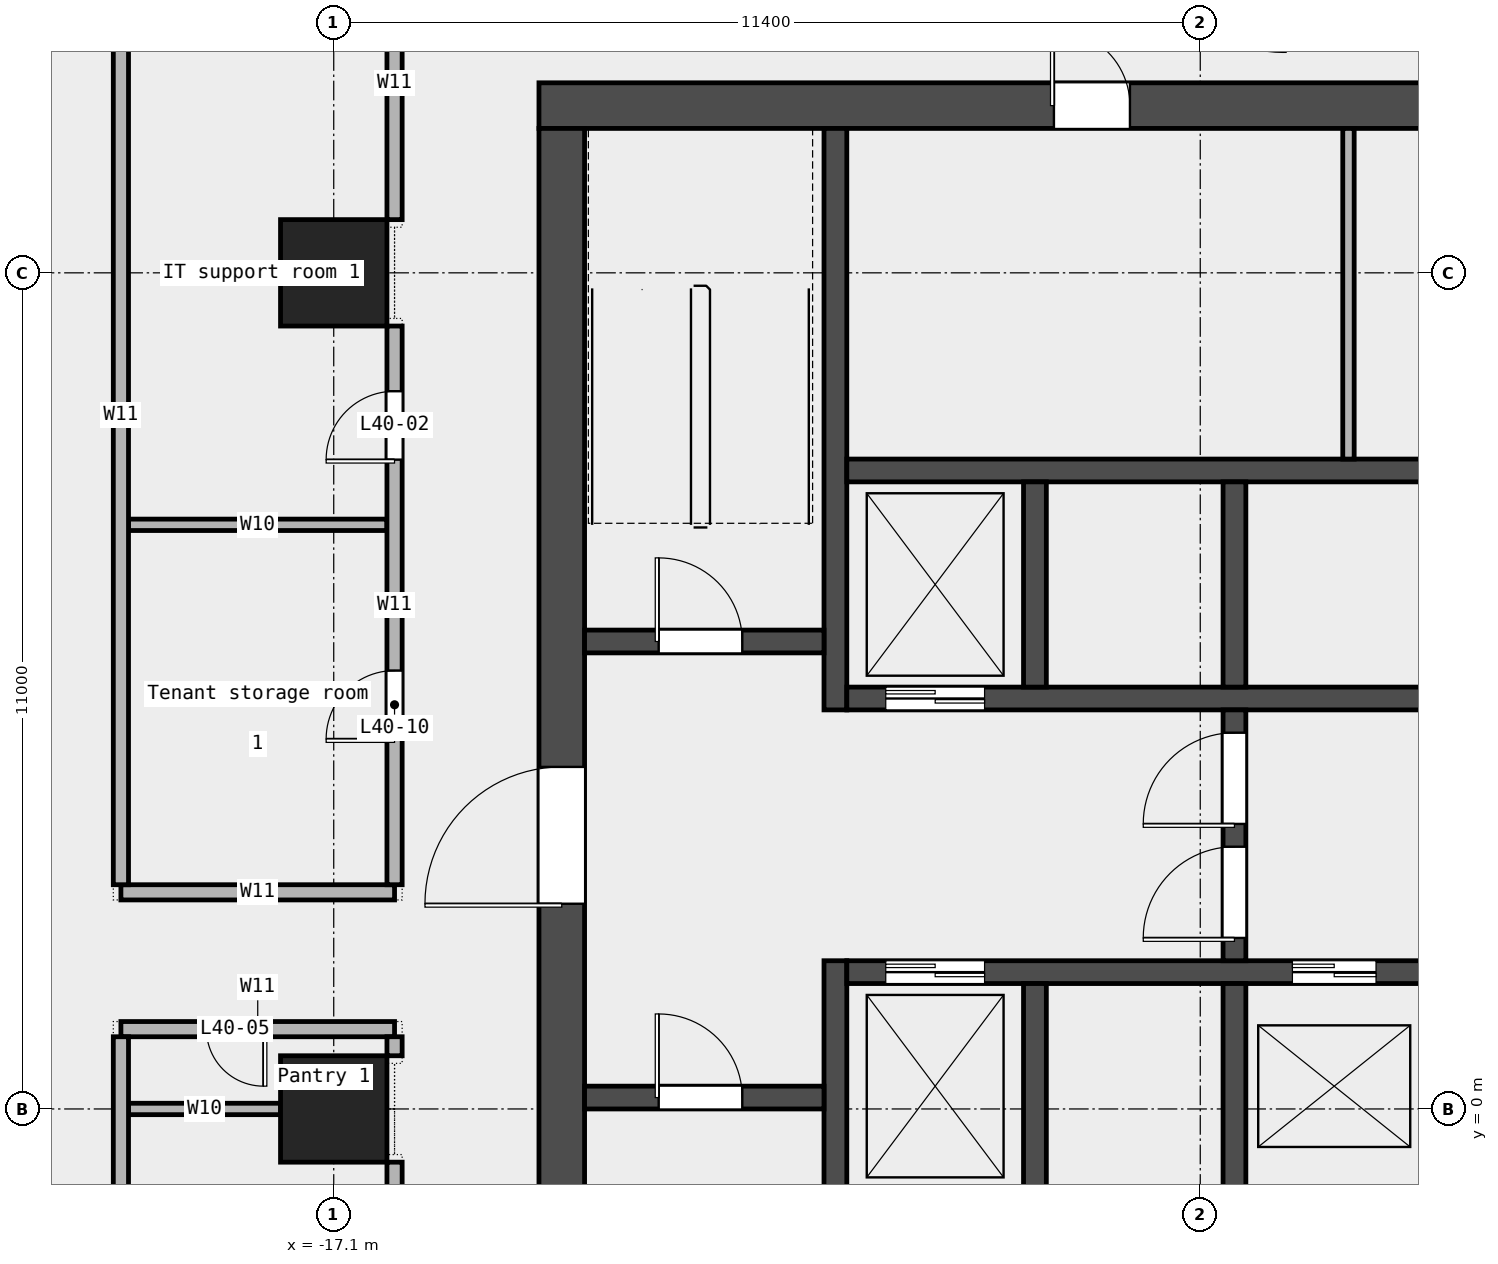
"""IFC4 building model, lengths in metres.
Left out: names, types, materials, properties, quantities, classifications, styles, units other than length and angle.
Written with IfcOpenShell. Run it as: python <this file> out.ifc"""

import sys

from ifc_helpers import new_model, si_unit, direction, frame, frame_2d, origin, origin_2d, place, context, subcontext, project, spatial, rectangle, extrude, element, fill, save


model = new_model("IFC4")
c1 = context("Model", 3, precision=1e-05, world=origin(), true_north=direction((0.0, 1.0)))
c2 = subcontext(c1, "Body", "Model", "MODEL_VIEW")
j1 = project(units=[si_unit("LENGTHUNIT", "METRE"), si_unit("PLANEANGLEUNIT", "RADIAN")], contexts=[c1])
p1 = place(None, origin())
s1 = spatial("IfcSite", under=j1, at=p1, CompositionType="ELEMENT")
p2 = place(p1, origin())
s2 = spatial("IfcBuilding", under=s1, at=p2, CompositionType="ELEMENT")
p3 = place(p2, frame((0.0, 0.0, 193.0)))
s3 = spatial("IfcBuildingStorey", under=s2, at=p3, CompositionType="ELEMENT", Elevation=193.0)
for number, where, z_axis, x_axis in (
    (1, (-17.1, 0.0, 0.0), (0.0, 0.0, 1.0), (1.0, 0.0, 0.0)),
    (2, (-17.1, 11.0, 0.0), (0.0, 0.0, 1.0), (1.0, 0.0, 0.0)),
):
    element("IfcColumn", number, at=place(p3, frame(where, z_axis=z_axis, x_axis=x_axis)), inside=s3, PredefinedType="COLUMN", context=c2, shape_type="SweptSolid", body=[
        extrude(rectangle(XDim=1.4, YDim=1.4, at=origin_2d()), origin(), (0.0, 0.0, 1.0), 3.6),
    ])
p4 = place(p3, frame((-19.8, 0.0, 0.0), z_axis=(0.0, 0.0, 1.0), x_axis=(1.0, 0.0, 0.0)))
e3 = element("IfcWall", 3, at=p4, inside=s3, PredefinedType="PARTITIONING", context=c2, shape_type="SweptSolid", body=[
    extrude(rectangle(XDim=2.0, YDim=0.15, at=frame_2d((1.0, 0.0))), origin(), (0.0, 0.0, 1.0), 3.6),
])
p5 = place(p3, frame((-19.9, 1.05, 0.0), z_axis=(0.0, 0.0, 1.0), x_axis=(1.0, 0.0, 0.0)))
e4 = element("IfcWall", 4, at=p5, inside=s3, PredefinedType="PARTITIONING", context=c2, shape_type="SweptSolid", body=[
    extrude(rectangle(XDim=3.6, YDim=0.2, at=frame_2d((1.8, 0.0))), origin(), (0.0, 0.0, 1.0), 3.6),
])
p6 = place(p5, frame((1.125, 0.0, 0.0)))
e5 = element("IfcOpeningElement", 5, at=p6, cuts=e4, PredefinedType="OPENING", context=c2, shape_type="SweptSolid", body=[
    extrude(rectangle(XDim=0.75, YDim=2.1, at=frame_2d((0.375, 1.05))), frame((0.0, 0.112, 0.0), z_axis=(0.0, -1.0, 0.0), x_axis=(1.0, 0.0, 0.0)), (0.0, 0.0, 1.0), 0.224),
])
p7 = place(p3, frame((-19.9, 2.85, 0.0), z_axis=(0.0, 0.0, 1.0), x_axis=(1.0, 0.0, 0.0)))
e6 = element("IfcWall", 6, at=p7, inside=s3, PredefinedType="PARTITIONING", context=c2, shape_type="SweptSolid", body=[
    extrude(rectangle(XDim=3.6, YDim=0.2, at=frame_2d((1.8, 0.0))), origin(), (0.0, 0.0, 1.0), 3.6),
])
p8 = place(p3, frame((-19.8, 7.685, 0.0), z_axis=(0.0, 0.0, 1.0), x_axis=(1.0, 0.0, 0.0)))
e7 = element("IfcWall", 7, at=p8, inside=s3, PredefinedType="PARTITIONING", context=c2, shape_type="SweptSolid", body=[
    extrude(rectangle(XDim=3.4, YDim=0.15, at=frame_2d((1.7, 0.0))), origin(), (0.0, 0.0, 1.0), 3.6),
])
p9 = place(p3, frame((-19.9, -9.0, 0.0), z_axis=(0.0, 0.0, 1.0), x_axis=(0.0, 1.0, 0.0)))
e8 = element("IfcWall", 8, at=p9, inside=s3, PredefinedType="PARTITIONING", context=c2, shape_type="SweptSolid", body=[
    extrude(rectangle(XDim=9.95, YDim=0.2, at=frame_2d((4.975, 0.0))), origin(), (0.0, 0.0, 1.0), 3.6),
])
p10 = place(p3, frame((-19.9, 2.95, 0.0), z_axis=(0.0, 0.0, 1.0), x_axis=(0.0, 1.0, 0.0)))
e9 = element("IfcWall", 9, at=p10, inside=s3, PredefinedType="PARTITIONING", context=c2, shape_type="SweptSolid", body=[
    extrude(rectangle(XDim=12.35, YDim=0.2, at=frame_2d((6.175, 0.0))), origin(), (0.0, 0.0, 1.0), 3.6),
])
p11 = place(p3, frame((-16.3, -9.0, 0.0), z_axis=(0.0, 0.0, 1.0), x_axis=(0.0, 1.0, 0.0)))
e10 = element("IfcWall", 10, at=p11, inside=s3, PredefinedType="PARTITIONING", context=c2, shape_type="SweptSolid", body=[
    extrude(rectangle(XDim=8.3, YDim=0.2, at=frame_2d((4.15, 0.0))), origin(), (0.0, 0.0, 1.0), 3.6),
])
p12 = place(p3, frame((-16.3, 0.7, 0.0), z_axis=(0.0, 0.0, 1.0), x_axis=(0.0, 1.0, 0.0)))
e11 = element("IfcWall", 11, at=p12, inside=s3, PredefinedType="PARTITIONING", context=c2, shape_type="SweptSolid", body=[
    extrude(rectangle(XDim=0.25, YDim=0.2, at=frame_2d((0.125, 0.0))), origin(), (0.0, 0.0, 1.0), 3.6),
])
p13 = place(p3, frame((-16.3, 2.95, 0.0), z_axis=(0.0, 0.0, 1.0), x_axis=(0.0, 1.0, 0.0)))
e12 = element("IfcWall", 12, at=p13, inside=s3, PredefinedType="PARTITIONING", context=c2, shape_type="SweptSolid", body=[
    extrude(rectangle(XDim=7.35, YDim=0.2, at=frame_2d((3.675, 0.0))), origin(), (0.0, 0.0, 1.0), 3.6),
])
p14 = place(p13, frame((5.593, 0.0, 0.0)))
e13 = element("IfcOpeningElement", 13, at=p14, cuts=e12, PredefinedType="OPENING", context=c2, shape_type="SweptSolid", body=[
    extrude(rectangle(XDim=0.9, YDim=2.1, at=frame_2d((0.45, 1.05))), frame((0.0, 0.112, 0.0), z_axis=(0.0, -1.0, 0.0), x_axis=(1.0, 0.0, 0.0)), (0.0, 0.0, 1.0), 0.224),
])
p15 = place(p13, frame((1.917, 0.0, 0.0)))
e14 = element("IfcOpeningElement", 14, at=p15, cuts=e12, PredefinedType="OPENING", context=c2, shape_type="SweptSolid", body=[
    extrude(rectangle(XDim=0.9, YDim=2.1, at=frame_2d((0.45, 1.05))), frame((0.0, 0.112, 0.0), z_axis=(0.0, -1.0, 0.0), x_axis=(1.0, 0.0, 0.0)), (0.0, 0.0, 1.0), 0.224),
])
p16 = place(p3, frame((-16.3, 11.7, 0.0), z_axis=(0.0, 0.0, 1.0), x_axis=(0.0, 1.0, 0.0)))
e15 = element("IfcWall", 15, at=p16, inside=s3, PredefinedType="PARTITIONING", context=c2, shape_type="SweptSolid", body=[
    extrude(rectangle(XDim=3.6, YDim=0.2, at=frame_2d((1.8, 0.0))), origin(), (0.0, 0.0, 1.0), 3.6),
])
p17 = place(p3, frame((-14.4, 13.2, 0.0), z_axis=(0.0, 0.0, 1.0), x_axis=(1.0, 0.0, 0.0)))
e16 = element("IfcWall", 16, at=p17, inside=s3, PredefinedType="SHEAR", context=c2, shape_type="SweptSolid", body=[
    extrude(rectangle(XDim=28.8, YDim=0.6, at=frame_2d((14.4, 0.0))), origin(), (0.0, 0.0, 1.0), 3.7),
])
p18 = place(p17, frame((6.775, 0.0, 0.0)))
e17 = element("IfcOpeningElement", 17, at=p18, cuts=e16, PredefinedType="OPENING", context=c2, shape_type="SweptSolid", body=[
    extrude(rectangle(XDim=1.0, YDim=2.1, at=frame_2d((0.5, 1.05))), frame((0.0, 0.312, 0.0), z_axis=(0.0, -1.0, 0.0), x_axis=(1.0, 0.0, 0.0)), (0.0, 0.0, 1.0), 0.624),
])
p19 = place(p17, frame((13.525, 0.0, 0.0)))
e18 = element("IfcOpeningElement", 18, at=p19, cuts=e16, PredefinedType="OPENING", context=c2, shape_type="SweptSolid", body=[
    extrude(rectangle(XDim=1.0, YDim=2.1, at=frame_2d((0.5, 1.05))), frame((0.0, 0.312, 0.0), z_axis=(0.0, -1.0, 0.0), x_axis=(1.0, 0.0, 0.0)), (0.0, 0.0, 1.0), 0.624),
])
p20 = place(p17, frame((20.65, 0.0, 0.0)))
e19 = element("IfcOpeningElement", 19, at=p20, cuts=e16, PredefinedType="OPENING", context=c2, shape_type="SweptSolid", body=[
    extrude(rectangle(XDim=1.0, YDim=2.1, at=frame_2d((0.5, 1.05))), frame((0.0, 0.312, 0.0), z_axis=(0.0, -1.0, 0.0), x_axis=(1.0, 0.0, 0.0)), (0.0, 0.0, 1.0), 0.624),
])
p21 = place(p3, frame((-14.1, -6.6, 0.0), z_axis=(0.0, 0.0, 1.0), x_axis=(0.0, 1.0, 0.0)))
e20 = element("IfcWall", 20, at=p21, inside=s3, PredefinedType="SHEAR", context=c2, shape_type="SweptSolid", body=[
    extrude(rectangle(XDim=19.5, YDim=0.6, at=frame_2d((9.75, 0.0))), origin(), (0.0, 0.0, 1.0), 3.7),
])
p22 = place(p21, frame((9.3, 0.0, 0.0)))
e21 = element("IfcOpeningElement", 21, at=p22, cuts=e20, PredefinedType="OPENING", context=c2, shape_type="SweptSolid", body=[
    extrude(rectangle(XDim=1.8, YDim=2.1, at=frame_2d((0.9, 1.05))), frame((0.0, 0.312, 0.0), z_axis=(0.0, -1.0, 0.0), x_axis=(1.0, 0.0, 0.0)), (0.0, 0.0, 1.0), 0.624),
])
p23 = place(p3, frame((-10.5, -6.6, 0.0), z_axis=(0.0, 0.0, 1.0), x_axis=(0.0, 1.0, 0.0)))
e22 = element("IfcWall", 22, at=p23, inside=s3, PredefinedType="SHEAR", context=c2, shape_type="SweptSolid", body=[
    extrude(rectangle(XDim=8.55, YDim=0.3, at=frame_2d((4.275, 0.0))), origin(), (0.0, 0.0, 1.0), 3.7),
])
p24 = place(p3, frame((-10.5, 5.25, 0.0), z_axis=(0.0, 0.0, 1.0), x_axis=(0.0, 1.0, 0.0)))
e23 = element("IfcWall", 23, at=p24, inside=s3, PredefinedType="SHEAR", context=c2, shape_type="SweptSolid", body=[
    extrude(rectangle(XDim=7.65, YDim=0.3, at=frame_2d((3.825, 0.0))), origin(), (0.0, 0.0, 1.0), 3.7),
])
p25 = place(p3, frame((-13.8, 0.15, 0.0), z_axis=(0.0, 0.0, 1.0), x_axis=(1.0, 0.0, 0.0)))
e24 = element("IfcWall", 24, at=p25, inside=s3, PredefinedType="SOLIDWALL", context=c2, shape_type="SweptSolid", body=[
    extrude(rectangle(XDim=3.15, YDim=0.3, at=frame_2d((1.575, 0.0))), origin(), (0.0, 0.0, 1.0), 3.7),
])
p26 = place(p25, frame((0.975, 0.0, 0.0)))
e25 = element("IfcOpeningElement", 25, at=p26, cuts=e24, PredefinedType="OPENING", context=c2, shape_type="SweptSolid", body=[
    extrude(rectangle(XDim=1.1, YDim=2.1, at=frame_2d((0.55, 1.05))), frame((0.0, 0.162, 0.0), z_axis=(0.0, -1.0, 0.0), x_axis=(1.0, 0.0, 0.0)), (0.0, 0.0, 1.0), 0.324),
])
p27 = place(p3, frame((-13.8, 6.15, 0.0), z_axis=(0.0, 0.0, 1.0), x_axis=(1.0, 0.0, 0.0)))
e26 = element("IfcWall", 26, at=p27, inside=s3, PredefinedType="SOLIDWALL", context=c2, shape_type="SweptSolid", body=[
    extrude(rectangle(XDim=3.15, YDim=0.3, at=frame_2d((1.575, 0.0))), origin(), (0.0, 0.0, 1.0), 3.7),
])
p28 = place(p27, frame((0.975, 0.0, 0.0)))
e27 = element("IfcOpeningElement", 27, at=p28, cuts=e26, PredefinedType="OPENING", context=c2, shape_type="SweptSolid", body=[
    extrude(rectangle(XDim=1.1, YDim=2.1, at=frame_2d((0.55, 1.05))), frame((0.0, 0.162, 0.0), z_axis=(0.0, -1.0, 0.0), x_axis=(1.0, 0.0, 0.0)), (0.0, 0.0, 1.0), 0.324),
])
p29 = place(p3, frame((-10.35, 1.8, 0.0), z_axis=(0.0, 0.0, 1.0), x_axis=(1.0, 0.0, 0.0)))
e28 = element("IfcWall", 28, at=p29, inside=s3, PredefinedType="SOLIDWALL", context=c2, shape_type="SweptSolid", body=[
    extrude(rectangle(XDim=20.7, YDim=0.3, at=frame_2d((10.35, 0.0))), origin(), (0.0, 0.0, 1.0), 3.7),
])
p30 = place(p29, frame((0.512, 0.0, 0.0)))
e29 = element("IfcOpeningElement", 29, at=p30, cuts=e28, PredefinedType="OPENING", context=c2, shape_type="SweptSolid", body=[
    extrude(rectangle(XDim=1.3, YDim=2.1, at=frame_2d((0.65, 1.05))), frame((0.0, 0.162, 0.0), z_axis=(0.0, -1.0, 0.0), x_axis=(1.0, 0.0, 0.0)), (0.0, 0.0, 1.0), 0.324),
])
p31 = place(p29, frame((5.863, 0.0, 0.0)))
e30 = element("IfcOpeningElement", 30, at=p31, cuts=e28, PredefinedType="OPENING", context=c2, shape_type="SweptSolid", body=[
    extrude(rectangle(XDim=1.1, YDim=2.1, at=frame_2d((0.55, 1.05))), frame((0.0, 0.162, 0.0), z_axis=(0.0, -1.0, 0.0), x_axis=(1.0, 0.0, 0.0)), (0.0, 0.0, 1.0), 0.324),
])
p32 = place(p29, frame((8.488, 0.0, 0.0)))
e31 = element("IfcOpeningElement", 31, at=p32, cuts=e28, PredefinedType="OPENING", context=c2, shape_type="SweptSolid", body=[
    extrude(rectangle(XDim=1.1, YDim=2.1, at=frame_2d((0.55, 1.05))), frame((0.0, 0.162, 0.0), z_axis=(0.0, -1.0, 0.0), x_axis=(1.0, 0.0, 0.0)), (0.0, 0.0, 1.0), 0.324),
])
p33 = place(p29, frame((11.113, 0.0, 0.0)))
e32 = element("IfcOpeningElement", 32, at=p33, cuts=e28, PredefinedType="OPENING", context=c2, shape_type="SweptSolid", body=[
    extrude(rectangle(XDim=1.1, YDim=2.1, at=frame_2d((0.55, 1.05))), frame((0.0, 0.162, 0.0), z_axis=(0.0, -1.0, 0.0), x_axis=(1.0, 0.0, 0.0)), (0.0, 0.0, 1.0), 0.324),
])
p34 = place(p29, frame((13.738, 0.0, 0.0)))
e33 = element("IfcOpeningElement", 33, at=p34, cuts=e28, PredefinedType="OPENING", context=c2, shape_type="SweptSolid", body=[
    extrude(rectangle(XDim=1.1, YDim=2.1, at=frame_2d((0.55, 1.05))), frame((0.0, 0.162, 0.0), z_axis=(0.0, -1.0, 0.0), x_axis=(1.0, 0.0, 0.0)), (0.0, 0.0, 1.0), 0.324),
])
p35 = place(p29, frame((16.363, 0.0, 0.0)))
e34 = element("IfcOpeningElement", 34, at=p35, cuts=e28, PredefinedType="OPENING", context=c2, shape_type="SweptSolid", body=[
    extrude(rectangle(XDim=1.1, YDim=2.1, at=frame_2d((0.55, 1.05))), frame((0.0, 0.162, 0.0), z_axis=(0.0, -1.0, 0.0), x_axis=(1.0, 0.0, 0.0)), (0.0, 0.0, 1.0), 0.324),
])
p36 = place(p29, frame((18.988, 0.0, 0.0)))
e35 = element("IfcOpeningElement", 35, at=p36, cuts=e28, PredefinedType="OPENING", context=c2, shape_type="SweptSolid", body=[
    extrude(rectangle(XDim=1.1, YDim=2.1, at=frame_2d((0.55, 1.05))), frame((0.0, 0.162, 0.0), z_axis=(0.0, -1.0, 0.0), x_axis=(1.0, 0.0, 0.0)), (0.0, 0.0, 1.0), 0.324),
])
p37 = place(p3, frame((-10.35, 5.4, 0.0), z_axis=(0.0, 0.0, 1.0), x_axis=(1.0, 0.0, 0.0)))
e36 = element("IfcWall", 36, at=p37, inside=s3, PredefinedType="SOLIDWALL", context=c2, shape_type="SweptSolid", body=[
    extrude(rectangle(XDim=20.7, YDim=0.3, at=frame_2d((10.35, 0.0))), origin(), (0.0, 0.0, 1.0), 3.7),
])
p38 = place(p37, frame((0.512, 0.0, 0.0)))
e37 = element("IfcOpeningElement", 37, at=p38, cuts=e36, PredefinedType="OPENING", context=c2, shape_type="SweptSolid", body=[
    extrude(rectangle(XDim=1.3, YDim=2.1, at=frame_2d((0.65, 1.05))), frame((0.0, 0.162, 0.0), z_axis=(0.0, -1.0, 0.0), x_axis=(1.0, 0.0, 0.0)), (0.0, 0.0, 1.0), 0.324),
])
p39 = place(p3, frame((-10.35, 8.4, 0.0), z_axis=(0.0, 0.0, 1.0), x_axis=(1.0, 0.0, 0.0)))
e38 = element("IfcWall", 38, at=p39, inside=s3, PredefinedType="SOLIDWALL", context=c2, shape_type="SweptSolid", body=[
    extrude(rectangle(XDim=20.7, YDim=0.3, at=frame_2d((10.35, 0.0))), origin(), (0.0, 0.0, 1.0), 3.7),
])
for number, where, z_axis, x_axis in (
    (39, (-7.875, -1.05, 0.0), (0.0, 0.0, 1.0), (0.0, 1.0, 0.0)),
    (40, (-5.25, -1.05, 0.0), (0.0, 0.0, 1.0), (0.0, 1.0, 0.0)),
    (41, (-7.875, 5.55, 0.0), (0.0, 0.0, 1.0), (0.0, 1.0, 0.0)),
    (42, (-5.25, 5.55, 0.0), (0.0, 0.0, 1.0), (0.0, 1.0, 0.0)),
):
    element("IfcWall", number, at=place(p3, frame(where, z_axis=z_axis, x_axis=x_axis)), inside=s3, PredefinedType="SOLIDWALL", context=c2, shape_type="SweptSolid", body=[
        extrude(rectangle(XDim=2.7, YDim=0.3, at=frame_2d((1.35, 0.0))), origin(), (0.0, 0.0, 1.0), 3.7),
    ])
p40 = place(p3, frame((-5.25, 1.95, 0.0), z_axis=(0.0, 0.0, 1.0), x_axis=(0.0, 1.0, 0.0)))
e43 = element("IfcWall", 43, at=p40, inside=s3, PredefinedType="SOLIDWALL", context=c2, shape_type="SweptSolid", body=[
    extrude(rectangle(XDim=3.3, YDim=0.3, at=frame_2d((1.65, 0.0))), origin(), (0.0, 0.0, 1.0), 3.7),
])
p41 = place(p40, frame((0.3, 0.0, 0.0)))
e44 = element("IfcOpeningElement", 44, at=p41, cuts=e43, PredefinedType="OPENING", context=c2, shape_type="SweptSolid", body=[
    extrude(rectangle(XDim=1.2, YDim=2.1, at=frame_2d((0.6, 1.05))), frame((0.0, 0.162, 0.0), z_axis=(0.0, -1.0, 0.0), x_axis=(1.0, 0.0, 0.0)), (0.0, 0.0, 1.0), 0.324),
])
p42 = place(p40, frame((1.8, 0.0, 0.0)))
e45 = element("IfcOpeningElement", 45, at=p42, cuts=e43, PredefinedType="OPENING", context=c2, shape_type="SweptSolid", body=[
    extrude(rectangle(XDim=1.2, YDim=2.1, at=frame_2d((0.6, 1.05))), frame((0.0, 0.162, 0.0), z_axis=(0.0, -1.0, 0.0), x_axis=(1.0, 0.0, 0.0)), (0.0, 0.0, 1.0), 0.324),
])
p43 = place(p3, frame((-3.75, 8.55, 0.0), z_axis=(0.0, 0.0, 1.0), x_axis=(0.0, 1.0, 0.0)))
e46 = element("IfcWall", 46, at=p43, inside=s3, PredefinedType="PARTITIONING", context=c2, shape_type="SweptSolid", body=[
    extrude(rectangle(XDim=4.35, YDim=0.15, at=frame_2d((2.175, 0.0))), origin(), (0.0, 0.0, 1.0), 3.7),
])
p44 = place(p14, origin())
e47 = element("IfcDoor", 47, at=p44, inside=s3, OperationType="SINGLE_SWING_LEFT", PredefinedType="DOOR", context=c2, shape_type="SweptSolid", body=[
    extrude(rectangle(XDim=0.9, YDim=2.1, at=frame_2d((0.45, 1.05))), frame((0.0, 0.025, 0.0), z_axis=(0.0, -1.0, 0.0), x_axis=(1.0, 0.0, 0.0)), (0.0, 0.0, 1.0), 0.05),
])
fill(e13, e47)
p45 = place(p6, origin())
e48 = element("IfcDoor", 48, at=p45, inside=s3, OperationType="SINGLE_SWING_LEFT", PredefinedType="DOOR", context=c2, shape_type="SweptSolid", body=[
    extrude(rectangle(XDim=0.75, YDim=2.1, at=frame_2d((0.375, 1.05))), frame((0.0, 0.025, 0.0), z_axis=(0.0, -1.0, 0.0), x_axis=(1.0, 0.0, 0.0)), (0.0, 0.0, 1.0), 0.05),
])
fill(e5, e48)
p46 = place(p15, origin())
e49 = element("IfcDoor", 49, at=p46, inside=s3, OperationType="SINGLE_SWING_LEFT", PredefinedType="DOOR", context=c2, shape_type="SweptSolid", body=[
    extrude(rectangle(XDim=0.9, YDim=2.1, at=frame_2d((0.45, 1.05))), frame((0.0, 0.025, 0.0), z_axis=(0.0, -1.0, 0.0), x_axis=(1.0, 0.0, 0.0)), (0.0, 0.0, 1.0), 0.05),
])
fill(e14, e49)
p47 = place(p26, origin())
e50 = element("IfcDoor", 50, at=p47, inside=s3, OperationType="SINGLE_SWING_LEFT", PredefinedType="DOOR", context=c2, shape_type="SweptSolid", body=[
    extrude(rectangle(XDim=1.1, YDim=2.1, at=frame_2d((0.55, 1.05))), frame((0.0, 0.025, 0.0), z_axis=(0.0, -1.0, 0.0), x_axis=(1.0, 0.0, 0.0)), (0.0, 0.0, 1.0), 0.05),
])
fill(e25, e50)
p48 = place(p28, origin())
e51 = element("IfcDoor", 51, at=p48, inside=s3, OperationType="SINGLE_SWING_LEFT", PredefinedType="DOOR", context=c2, shape_type="SweptSolid", body=[
    extrude(rectangle(XDim=1.1, YDim=2.1, at=frame_2d((0.55, 1.05))), frame((0.0, 0.025, 0.0), z_axis=(0.0, -1.0, 0.0), x_axis=(1.0, 0.0, 0.0)), (0.0, 0.0, 1.0), 0.05),
])
fill(e27, e51)
p49 = place(p22, origin())
e52 = element("IfcDoor", 52, at=p49, inside=s3, OperationType="DOUBLE_DOOR_SINGLE_SWING", PredefinedType="DOOR", context=c2, shape_type="SweptSolid", body=[
    extrude(rectangle(XDim=1.8, YDim=2.1, at=frame_2d((0.9, 1.05))), frame((0.0, 0.025, 0.0), z_axis=(0.0, -1.0, 0.0), x_axis=(1.0, 0.0, 0.0)), (0.0, 0.0, 1.0), 0.05),
])
fill(e21, e52)
p50 = place(p41, origin())
e53 = element("IfcDoor", 53, at=p50, inside=s3, OperationType="SINGLE_SWING_LEFT", PredefinedType="DOOR", context=c2, shape_type="SweptSolid", body=[
    extrude(rectangle(XDim=1.2, YDim=2.1, at=frame_2d((0.6, 1.05))), frame((0.0, 0.025, 0.0), z_axis=(0.0, -1.0, 0.0), x_axis=(1.0, 0.0, 0.0)), (0.0, 0.0, 1.0), 0.05),
])
fill(e44, e53)
p51 = place(p42, origin())
e54 = element("IfcDoor", 54, at=p51, inside=s3, OperationType="SINGLE_SWING_RIGHT", PredefinedType="DOOR", context=c2, shape_type="SweptSolid", body=[
    extrude(rectangle(XDim=1.2, YDim=2.1, at=frame_2d((0.6, 1.05))), frame((0.0, 0.025, 0.0), z_axis=(0.0, -1.0, 0.0), x_axis=(1.0, 0.0, 0.0)), (0.0, 0.0, 1.0), 0.05),
])
fill(e45, e54)
p52 = place(p30, origin())
e55 = element("IfcDoor", 55, at=p52, inside=s3, OperationType="DOUBLE_DOOR_SLIDING", PredefinedType="DOOR", context=c2, shape_type="SweptSolid", body=[
    extrude(rectangle(XDim=1.3, YDim=2.1, at=frame_2d((0.65, 1.05))), frame((0.0, 0.025, 0.0), z_axis=(0.0, -1.0, 0.0), x_axis=(1.0, 0.0, 0.0)), (0.0, 0.0, 1.0), 0.05),
])
fill(e29, e55)
p53 = place(p31, origin())
e56 = element("IfcDoor", 56, at=p53, inside=s3, OperationType="DOUBLE_DOOR_SLIDING", PredefinedType="DOOR", context=c2, shape_type="SweptSolid", body=[
    extrude(rectangle(XDim=1.1, YDim=2.1, at=frame_2d((0.55, 1.05))), frame((0.0, 0.025, 0.0), z_axis=(0.0, -1.0, 0.0), x_axis=(1.0, 0.0, 0.0)), (0.0, 0.0, 1.0), 0.05),
])
fill(e30, e56)
p54 = place(p38, origin())
e57 = element("IfcDoor", 57, at=p54, inside=s3, OperationType="DOUBLE_DOOR_SLIDING", PredefinedType="DOOR", context=c2, shape_type="SweptSolid", body=[
    extrude(rectangle(XDim=1.3, YDim=2.1, at=frame_2d((0.65, 1.05))), frame((0.0, 0.025, 0.0), z_axis=(0.0, -1.0, 0.0), x_axis=(1.0, 0.0, 0.0)), (0.0, 0.0, 1.0), 0.05),
])
fill(e37, e57)
p55 = place(p18, origin())
e58 = element("IfcDoor", 58, at=p55, inside=s3, OperationType="SINGLE_SWING_LEFT", PredefinedType="DOOR", context=c2, shape_type="SweptSolid", body=[
    extrude(rectangle(XDim=1.0, YDim=2.1, at=frame_2d((0.5, 1.05))), frame((0.0, 0.025, 0.0), z_axis=(0.0, -1.0, 0.0), x_axis=(1.0, 0.0, 0.0)), (0.0, 0.0, 1.0), 0.05),
])
fill(e17, e58)
save(model, sys.argv[1])
